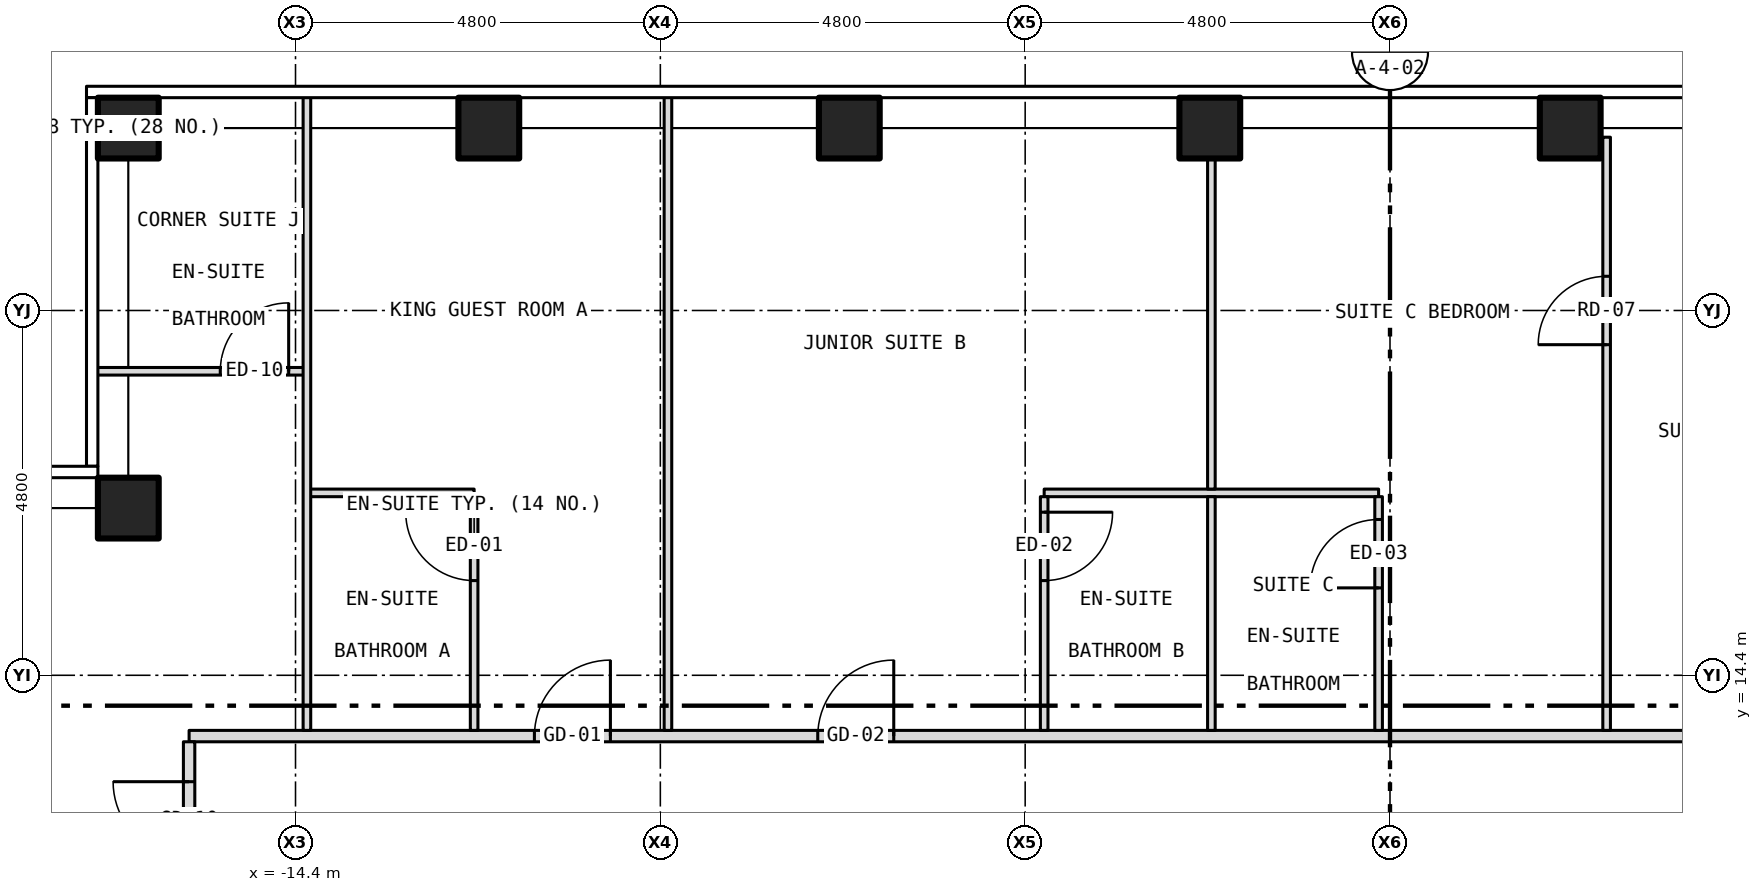
"""IFC4 building model, lengths in metres.
Left out: names, types, materials, properties, quantities, classifications, styles, units other than length and angle.
Written with IfcOpenShell. Run it as: python <this file> out.ifc"""

import sys

from ifc_helpers import new_model, si_unit, direction, frame, frame_2d, origin, origin_2d, place, context, subcontext, project, spatial, rectangle, hollow_rectangle, extrude, element, fill, save


model = new_model("IFC4")
c1 = context("Model", 3, precision=1e-05, world=origin(), true_north=direction((0.0, 1.0)))
c2 = subcontext(c1, "Body", "Model", "MODEL_VIEW")
j1 = project(units=[si_unit("LENGTHUNIT", "METRE"), si_unit("PLANEANGLEUNIT", "RADIAN")], contexts=[c1])
p1 = place(None, origin())
s1 = spatial("IfcSite", under=j1, at=p1, CompositionType="ELEMENT")
p2 = place(p1, origin())
s2 = spatial("IfcBuilding", under=s1, at=p2, CompositionType="ELEMENT")
p3 = place(p2, frame((0.0, 0.0, 176.0)))
s3 = spatial("IfcBuildingStorey", under=s2, at=p3, CompositionType="ELEMENT", Elevation=176.0)
for number, where, z_axis, x_axis in (
    (1, (-16.6, 21.6, -0.15), (0.0, 0.0, 1.0), (1.0, 0.0, 0.0)),
    (2, (-11.857, 21.6, -0.15), (0.0, 0.0, 1.0), (1.0, 0.0, 0.0)),
    (3, (-7.114, 21.6, -0.15), (0.0, 0.0, 1.0), (1.0, 0.0, 0.0)),
    (4, (-2.371, 21.6, -0.15), (0.0, 0.0, 1.0), (1.0, 0.0, 0.0)),
    (5, (2.371, 21.6, -0.15), (0.0, 0.0, 1.0), (1.0, 0.0, 0.0)),
    (6, (-16.6, 16.6, -0.15), (0.0, 0.0, 1.0), (1.0, 0.0, 0.0)),
):
    element("IfcColumn", number, at=place(p3, frame(where, z_axis=z_axis, x_axis=x_axis)), inside=s3, PredefinedType="COLUMN", context=c2, shape_type="SweptSolid", body=[
        extrude(hollow_rectangle(XDim=0.8, YDim=0.8, WallThickness=0.045, at=origin_2d()), origin(), (0.0, 0.0, 1.0), 3.5),
    ])
p4 = place(p3, frame((-15.8, 13.6, 0.0), z_axis=(0.0, 0.0, 1.0), x_axis=(1.0, 0.0, 0.0)))
e7 = element("IfcWall", 7, at=p4, inside=s3, PredefinedType="PARTITIONING", context=c2, shape_type="SweptSolid", body=[
    extrude(rectangle(XDim=31.6, YDim=0.15, at=frame_2d((15.8, 0.0))), origin(), (0.0, 0.0, 1.0), 3.35),
])
p5 = place(p4, frame((4.543, 0.0, 0.0)))
e8 = element("IfcOpeningElement", 8, at=p5, cuts=e7, PredefinedType="OPENING", context=c2, shape_type="SweptSolid", body=[
    extrude(rectangle(XDim=1.0, YDim=2.1, at=frame_2d((0.5, 1.05))), frame((0.0, 0.087, 0.0), z_axis=(0.0, -1.0, 0.0), x_axis=(1.0, 0.0, 0.0)), (0.0, 0.0, 1.0), 0.174),
])
p6 = place(p4, frame((8.271, 0.0, 0.0)))
e9 = element("IfcOpeningElement", 9, at=p6, cuts=e7, PredefinedType="OPENING", context=c2, shape_type="SweptSolid", body=[
    extrude(rectangle(XDim=1.0, YDim=2.1, at=frame_2d((0.5, 1.05))), frame((0.0, 0.087, 0.0), z_axis=(0.0, -1.0, 0.0), x_axis=(1.0, 0.0, 0.0)), (0.0, 0.0, 1.0), 0.174),
])
p7 = place(p4, frame((20.28, 0.0, 0.0)))
e10 = element("IfcOpeningElement", 10, at=p7, cuts=e7, PredefinedType="OPENING", context=c2, shape_type="SweptSolid", body=[
    extrude(rectangle(XDim=1.0, YDim=2.1, at=frame_2d((0.5, 1.05))), frame((0.0, 0.087, 0.0), z_axis=(0.0, -1.0, 0.0), x_axis=(1.0, 0.0, 0.0)), (0.0, 0.0, 1.0), 0.174),
])
p8 = place(p4, frame((27.072, 0.0, 0.0)))
e11 = element("IfcOpeningElement", 11, at=p8, cuts=e7, PredefinedType="OPENING", context=c2, shape_type="SweptSolid", body=[
    extrude(rectangle(XDim=1.0, YDim=2.1, at=frame_2d((0.5, 1.05))), frame((0.0, 0.087, 0.0), z_axis=(0.0, -1.0, 0.0), x_axis=(1.0, 0.0, 0.0)), (0.0, 0.0, 1.0), 0.174),
])
p9 = place(p3, frame((-14.25, 16.8, 0.0), z_axis=(0.0, 0.0, 1.0), x_axis=(1.0, 0.0, 0.0)))
e12 = element("IfcWall", 12, at=p9, inside=s3, PredefinedType="PARTITIONING", context=c2, shape_type="SweptSolid", body=[
    extrude(rectangle(XDim=2.2, YDim=0.1, at=frame_2d((1.1, 0.0))), origin(), (0.0, 0.0, 1.0), 3.35),
])
p10 = place(p3, frame((-4.55, 16.8, 0.0), z_axis=(0.0, 0.0, 1.0), x_axis=(1.0, 0.0, 0.0)))
e13 = element("IfcWall", 13, at=p10, inside=s3, PredefinedType="PARTITIONING", context=c2, shape_type="SweptSolid", body=[
    extrude(rectangle(XDim=4.4, YDim=0.1, at=frame_2d((2.2, 0.0))), origin(), (0.0, 0.0, 1.0), 3.35),
])
p11 = place(p3, frame((-17.03, 18.4, 0.0), z_axis=(0.0, 0.0, 1.0), x_axis=(1.0, 0.0, 0.0)))
e14 = element("IfcWall", 14, at=p11, inside=s3, PredefinedType="PARTITIONING", context=c2, shape_type="SweptSolid", body=[
    extrude(rectangle(XDim=2.78, YDim=0.1, at=frame_2d((1.39, 0.0))), origin(), (0.0, 0.0, 1.0), 3.35),
])
p12 = place(p11, frame((1.64, 0.0, 0.0)))
e15 = element("IfcOpeningElement", 15, at=p12, cuts=e14, PredefinedType="OPENING", context=c2, shape_type="SweptSolid", body=[
    extrude(rectangle(XDim=0.9, YDim=2.1, at=frame_2d((0.45, 1.05))), frame((0.0, 0.062, 0.0), z_axis=(0.0, -1.0, 0.0), x_axis=(1.0, 0.0, 0.0)), (0.0, 0.0, 1.0), 0.124),
])
p13 = place(p3, frame((-15.8, 10.92, 0.0), z_axis=(0.0, 0.0, 1.0), x_axis=(0.0, 1.0, 0.0)))
e16 = element("IfcWall", 16, at=p13, inside=s3, PredefinedType="PARTITIONING", context=c2, shape_type="SweptSolid", body=[
    extrude(rectangle(XDim=2.605, YDim=0.15, at=frame_2d((1.302, 0.0))), origin(), (0.0, 0.0, 1.0), 3.35),
])
p14 = place(p13, frame((1.08, 0.0, 0.0)))
e17 = element("IfcOpeningElement", 17, at=p14, cuts=e16, PredefinedType="OPENING", context=c2, shape_type="SweptSolid", body=[
    extrude(rectangle(XDim=1.0, YDim=2.1, at=frame_2d((0.5, 1.05))), frame((0.0, 0.087, 0.0), z_axis=(0.0, -1.0, 0.0), x_axis=(1.0, 0.0, 0.0)), (0.0, 0.0, 1.0), 0.174),
])
p15 = place(p3, frame((-14.25, 13.675, 0.0), z_axis=(0.0, 0.0, 1.0), x_axis=(0.0, 1.0, 0.0)))
e18 = element("IfcWall", 18, at=p15, inside=s3, PredefinedType="PARTITIONING", context=c2, shape_type="SweptSolid", body=[
    extrude(rectangle(XDim=8.355, YDim=0.1, at=frame_2d((4.177, 0.0))), origin(), (0.0, 0.0, 1.0), 2.817),
])
p16 = place(p3, frame((-12.05, 13.675, 0.0), z_axis=(0.0, 0.0, 1.0), x_axis=(0.0, 1.0, 0.0)))
e19 = element("IfcWall", 19, at=p16, inside=s3, PredefinedType="PARTITIONING", context=c2, shape_type="SweptSolid", body=[
    extrude(rectangle(XDim=3.075, YDim=0.1, at=frame_2d((1.538, 0.0))), origin(), (0.0, 0.0, 1.0), 3.35),
])
p17 = place(p16, frame((1.971, 0.0, 0.0)))
e20 = element("IfcOpeningElement", 20, at=p17, cuts=e19, PredefinedType="OPENING", context=c2, shape_type="SweptSolid", body=[
    extrude(rectangle(XDim=0.9, YDim=2.1, at=frame_2d((0.45, 1.05))), frame((0.0, 0.062, 0.0), z_axis=(0.0, -1.0, 0.0), x_axis=(1.0, 0.0, 0.0)), (0.0, 0.0, 1.0), 0.124),
])
p18 = place(p3, frame((-9.5, 13.675, 0.0), z_axis=(0.0, 0.0, 1.0), x_axis=(0.0, 1.0, 0.0)))
e21 = element("IfcWall", 21, at=p18, inside=s3, PredefinedType="PARTITIONING", context=c2, shape_type="SweptSolid", body=[
    extrude(rectangle(XDim=8.355, YDim=0.1, at=frame_2d((4.177, 0.0))), origin(), (0.0, 0.0, 1.0), 2.728),
])
p19 = place(p3, frame((-4.55, 13.675, 0.0), z_axis=(0.0, 0.0, 1.0), x_axis=(0.0, 1.0, 0.0)))
e22 = element("IfcWall", 22, at=p19, inside=s3, PredefinedType="PARTITIONING", context=c2, shape_type="SweptSolid", body=[
    extrude(rectangle(XDim=3.075, YDim=0.1, at=frame_2d((1.538, 0.0))), origin(), (0.0, 0.0, 1.0), 3.35),
])
p20 = place(p19, frame((1.971, 0.0, 0.0)))
e23 = element("IfcOpeningElement", 23, at=p20, cuts=e22, PredefinedType="OPENING", context=c2, shape_type="SweptSolid", body=[
    extrude(rectangle(XDim=0.9, YDim=2.1, at=frame_2d((0.45, 1.05))), frame((0.0, 0.062, 0.0), z_axis=(0.0, -1.0, 0.0), x_axis=(1.0, 0.0, 0.0)), (0.0, 0.0, 1.0), 0.124),
])
p21 = place(p3, frame((-2.35, 13.675, 0.0), z_axis=(0.0, 0.0, 1.0), x_axis=(0.0, 1.0, 0.0)))
e24 = element("IfcWall", 24, at=p21, inside=s3, PredefinedType="PARTITIONING", context=c2, shape_type="SweptSolid", body=[
    extrude(rectangle(XDim=3.075, YDim=0.1, at=frame_2d((1.538, 0.0))), origin(), (0.0, 0.0, 1.0), 3.35),
])
p22 = place(p3, frame((-2.35, 16.85, 0.0), z_axis=(0.0, 0.0, 1.0), x_axis=(0.0, 1.0, 0.0)))
e25 = element("IfcWall", 25, at=p22, inside=s3, PredefinedType="PARTITIONING", context=c2, shape_type="SweptSolid", body=[
    extrude(rectangle(XDim=4.63, YDim=0.1, at=frame_2d((2.315, 0.0))), origin(), (0.0, 0.0, 1.0), 3.35),
])
p23 = place(p3, frame((-0.15, 13.675, 0.0), z_axis=(0.0, 0.0, 1.0), x_axis=(0.0, 1.0, 0.0)))
e26 = element("IfcWall", 26, at=p23, inside=s3, PredefinedType="PARTITIONING", context=c2, shape_type="SweptSolid", body=[
    extrude(rectangle(XDim=3.075, YDim=0.1, at=frame_2d((1.538, 0.0))), origin(), (0.0, 0.0, 1.0), 2.728),
])
p24 = place(p23, frame((1.875, 0.0, 0.0)))
e27 = element("IfcOpeningElement", 27, at=p24, cuts=e26, PredefinedType="OPENING", context=c2, shape_type="SweptSolid", body=[
    extrude(rectangle(XDim=0.9, YDim=2.1, at=frame_2d((0.45, 1.05))), frame((0.0, 0.062, 0.0), z_axis=(0.0, -1.0, 0.0), x_axis=(1.0, 0.0, 0.0)), (0.0, 0.0, 1.0), 0.124),
])
p25 = place(p3, frame((2.85, 13.675, 0.0), z_axis=(0.0, 0.0, 1.0), x_axis=(0.0, 1.0, 0.0)))
e28 = element("IfcWall", 28, at=p25, inside=s3, PredefinedType="PARTITIONING", context=c2, shape_type="SweptSolid", body=[
    extrude(rectangle(XDim=7.805, YDim=0.1, at=frame_2d((3.902, 0.0))), origin(), (0.0, 0.0, 1.0), 3.35),
])
p26 = place(p25, frame((5.075, 0.0, 0.0)))
e29 = element("IfcOpeningElement", 29, at=p26, cuts=e28, PredefinedType="OPENING", context=c2, shape_type="SweptSolid", body=[
    extrude(rectangle(XDim=0.9, YDim=2.1, at=frame_2d((0.45, 1.05))), frame((0.0, 0.062, 0.0), z_axis=(0.0, -1.0, 0.0), x_axis=(1.0, 0.0, 0.0)), (0.0, 0.0, 1.0), 0.124),
])
p27 = place(p5, origin())
e30 = element("IfcDoor", 30, at=p27, inside=s3, OperationType="SINGLE_SWING_RIGHT", PredefinedType="DOOR", context=c2, shape_type="SweptSolid", body=[
    extrude(rectangle(XDim=1.0, YDim=2.1, at=frame_2d((0.5, 1.05))), frame((0.0, 0.025, 0.0), z_axis=(0.0, -1.0, 0.0), x_axis=(1.0, 0.0, 0.0)), (0.0, 0.0, 1.0), 0.05),
])
fill(e8, e30)
p28 = place(p17, origin())
e31 = element("IfcDoor", 31, at=p28, inside=s3, OperationType="SINGLE_SWING_RIGHT", PredefinedType="DOOR", context=c2, shape_type="SweptSolid", body=[
    extrude(rectangle(XDim=0.9, YDim=2.1, at=frame_2d((0.45, 1.05))), frame((0.0, 0.025, 0.0), z_axis=(0.0, -1.0, 0.0), x_axis=(1.0, 0.0, 0.0)), (0.0, 0.0, 1.0), 0.05),
])
fill(e20, e31)
p29 = place(p6, origin())
e32 = element("IfcDoor", 32, at=p29, inside=s3, OperationType="SINGLE_SWING_RIGHT", PredefinedType="DOOR", context=c2, shape_type="SweptSolid", body=[
    extrude(rectangle(XDim=1.0, YDim=2.1, at=frame_2d((0.5, 1.05))), frame((0.0, 0.025, 0.0), z_axis=(0.0, -1.0, 0.0), x_axis=(1.0, 0.0, 0.0)), (0.0, 0.0, 1.0), 0.05),
])
fill(e9, e32)
p30 = place(p20, origin())
e33 = element("IfcDoor", 33, at=p30, inside=s3, OperationType="SINGLE_SWING_RIGHT", PredefinedType="DOOR", context=c2, shape_type="SweptSolid", body=[
    extrude(rectangle(XDim=0.9, YDim=2.1, at=frame_2d((0.45, 1.05))), frame((0.0, 0.025, 0.0), z_axis=(0.0, -1.0, 0.0), x_axis=(1.0, 0.0, 0.0)), (0.0, 0.0, 1.0), 0.05),
])
fill(e23, e33)
p31 = place(p26, origin())
e34 = element("IfcDoor", 34, at=p31, inside=s3, OperationType="SINGLE_SWING_LEFT", PredefinedType="DOOR", context=c2, shape_type="SweptSolid", body=[
    extrude(rectangle(XDim=0.9, YDim=2.1, at=frame_2d((0.45, 1.05))), frame((0.0, 0.025, 0.0), z_axis=(0.0, -1.0, 0.0), x_axis=(1.0, 0.0, 0.0)), (0.0, 0.0, 1.0), 0.05),
])
fill(e29, e34)
p32 = place(p24, origin())
e35 = element("IfcDoor", 35, at=p32, inside=s3, OperationType="SINGLE_SWING_LEFT", PredefinedType="DOOR", context=c2, shape_type="SweptSolid", body=[
    extrude(rectangle(XDim=0.9, YDim=2.1, at=frame_2d((0.45, 1.05))), frame((0.0, 0.025, 0.0), z_axis=(0.0, -1.0, 0.0), x_axis=(1.0, 0.0, 0.0)), (0.0, 0.0, 1.0), 0.05),
])
fill(e27, e35)
p33 = place(p12, origin())
e36 = element("IfcDoor", 36, at=p33, inside=s3, OperationType="SINGLE_SWING_RIGHT", PredefinedType="DOOR", context=c2, shape_type="SweptSolid", body=[
    extrude(rectangle(XDim=0.9, YDim=2.1, at=frame_2d((0.45, 1.05))), frame((0.0, 0.025, 0.0), z_axis=(0.0, -1.0, 0.0), x_axis=(1.0, 0.0, 0.0)), (0.0, 0.0, 1.0), 0.05),
])
fill(e15, e36)
p34 = place(p14, origin())
e37 = element("IfcDoor", 37, at=p34, inside=s3, OperationType="SINGLE_SWING_RIGHT", PredefinedType="DOOR", context=c2, shape_type="SweptSolid", body=[
    extrude(rectangle(XDim=1.0, YDim=2.1, at=frame_2d((0.5, 1.05))), frame((0.0, 0.025, 0.0), z_axis=(0.0, -1.0, 0.0), x_axis=(1.0, 0.0, 0.0)), (0.0, 0.0, 1.0), 0.05),
])
fill(e17, e37)
save(model, sys.argv[1])
